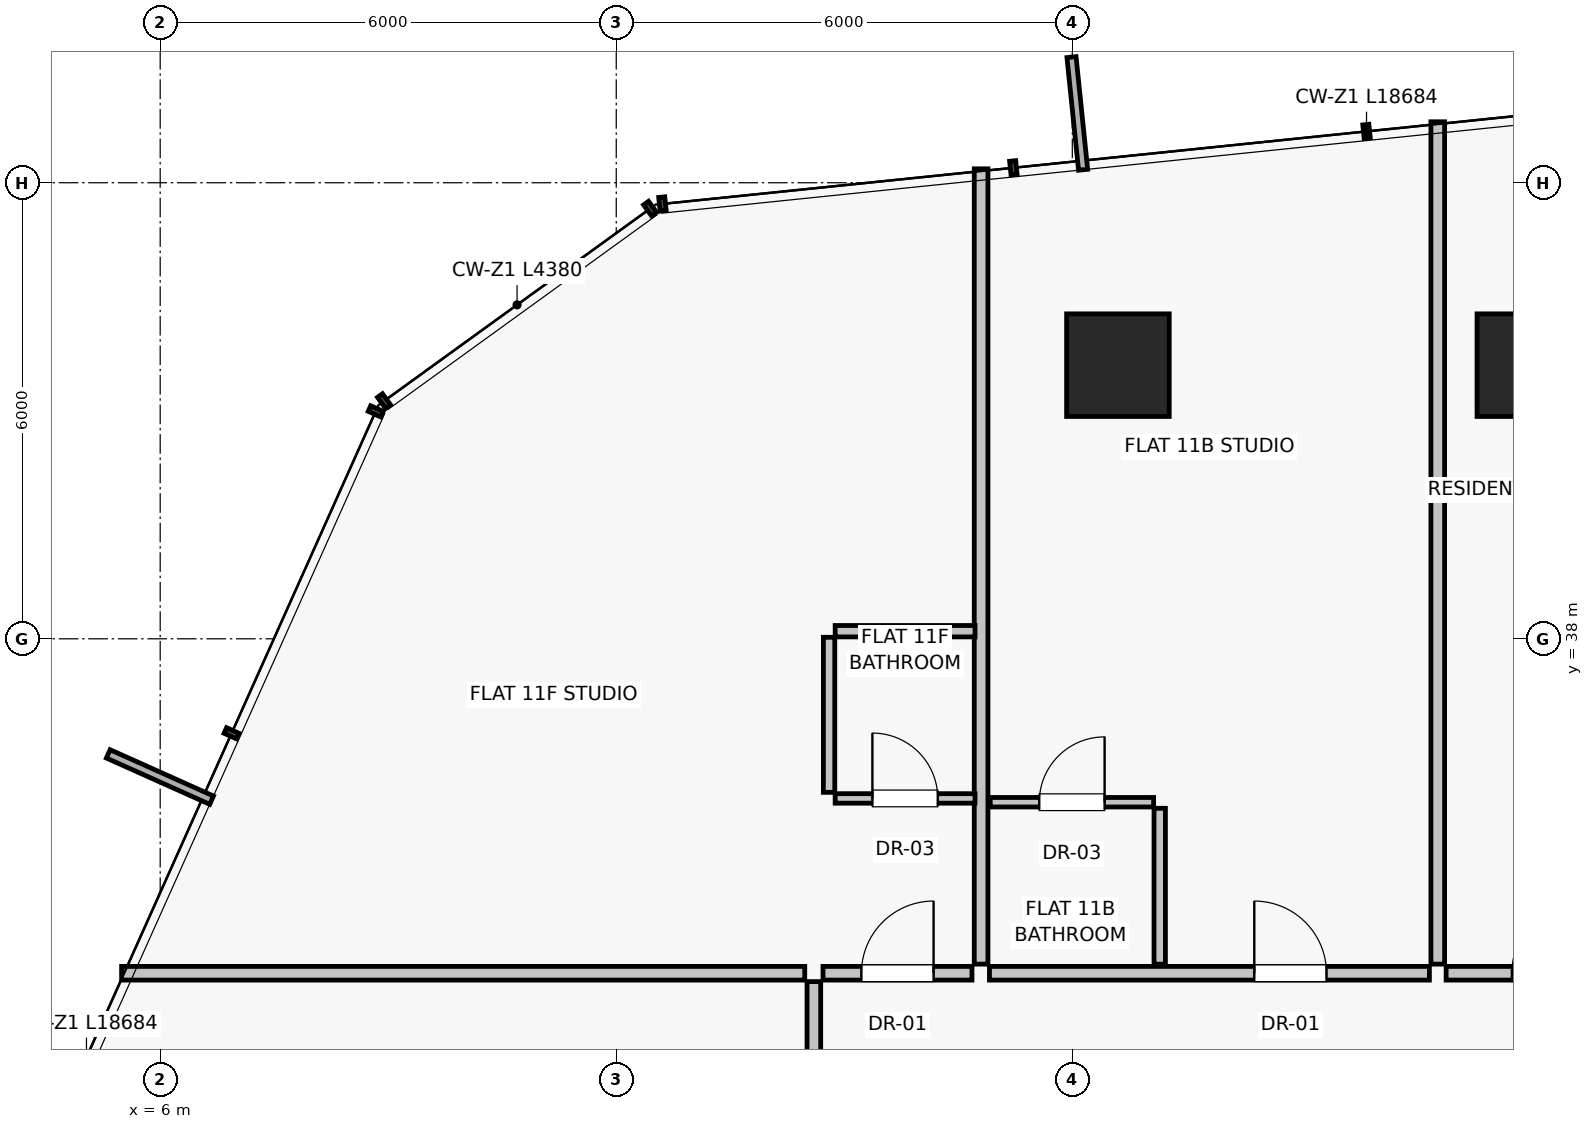
"""IFC4 building model, lengths in metres.
Left out: names, types, materials, properties, quantities, classifications, styles, units other than length and angle.
Written with IfcOpenShell. Run it as: python <this file> out.ifc"""

import sys

from ifc_helpers import new_model, si_unit, direction, frame, frame_2d, origin, origin_2d, place, context, subcontext, project, spatial, rectangle, extrude, source, transform, mapped, element, fill, save


model = new_model("IFC4")
c1 = context("Model", 3, precision=1e-05, world=origin(), true_north=direction((0.0, 1.0)))
c2 = subcontext(c1, "Body", "Model", "MODEL_VIEW")
j1 = project(units=[si_unit("LENGTHUNIT", "METRE"), si_unit("PLANEANGLEUNIT", "RADIAN")], contexts=[c1])
p1 = place(None, origin())
s1 = spatial("IfcSite", under=j1, at=p1, CompositionType="ELEMENT")
p2 = place(p1, origin())
s2 = spatial("IfcBuilding", under=s1, at=p2, CompositionType="ELEMENT")
p3 = place(p2, frame((0.0, 0.0, 43.55)))
s3 = spatial("IfcBuildingStorey", under=s2, at=p3, CompositionType="ELEMENT", Elevation=43.55)
for number, where, z_axis, x_axis in (
    (1, (24.0, 41.6, 0.0), (0.0, 0.0, 1.0), (1.0, 0.0, 0.0)),
    (2, (18.6, 41.6, 0.0), (0.0, 0.0, 1.0), (1.0, 0.0, 0.0)),
):
    element("IfcColumn", number, at=place(p3, frame(where, z_axis=z_axis, x_axis=x_axis)), inside=s3, PredefinedType="COLUMN", context=c2, shape_type="SweptSolid", body=[
        extrude(rectangle(XDim=1.35, YDim=1.35, at=origin_2d()), origin(), (0.0, 0.0, 1.0), 3.25),
    ])
p4 = place(p3, frame((16.8, 33.72, 0.0), z_axis=(0.0, 0.0, 1.0), x_axis=(0.0, 1.0, 0.0)))
e3 = element("IfcWall", 3, at=p4, inside=s3, PredefinedType="PARTITIONING", context=c2, shape_type="SweptSolid", body=[
    extrude(rectangle(XDim=10.463, YDim=0.18, at=frame_2d((5.231, 0.0))), origin(), (0.0, 0.0, 1.0), 3.0),
])
p5 = place(p3, frame((22.918, 33.6, 0.0), z_axis=(0.0, 0.0, 1.0), x_axis=(1.0, 0.0, 0.0)))
e4 = element("IfcWall", 4, at=p5, inside=s3, PredefinedType="PARTITIONING", context=c2, shape_type="SweptSolid", body=[
    extrude(rectangle(XDim=2.73, YDim=0.18, at=frame_2d((1.365, 0.0))), origin(), (0.0, 0.0, 1.0), 3.0),
])
p6 = place(p5, frame((0.865, 0.0, 0.0)))
e5 = element("IfcOpeningElement", 5, at=p6, cuts=e4, PredefinedType="OPENING", context=c2, shape_type="SweptSolid", body=[
    extrude(rectangle(XDim=1.0, YDim=2.01, at=frame_2d((0.5, 1.005))), frame((0.0, 0.1, 0.0), z_axis=(0.0, -1.0, 0.0), x_axis=(1.0, 0.0, 0.0)), (0.0, 0.0, 1.0), 0.2),
])
p7 = place(p3, frame((22.808, 33.72, 0.0), z_axis=(0.0, 0.0, 1.0), x_axis=(0.0, 1.0, 0.0)))
e6 = element("IfcWall", 6, at=p7, inside=s3, PredefinedType="PARTITIONING", context=c2, shape_type="SweptSolid", body=[
    extrude(rectangle(XDim=11.082, YDim=0.18, at=frame_2d((5.541, 0.0))), origin(), (0.0, 0.0, 1.0), 3.0),
])
p8 = place(p3, frame((16.91, 33.6, 0.0), z_axis=(0.0, 0.0, 1.0), x_axis=(1.0, 0.0, 0.0)))
e7 = element("IfcWall", 7, at=p8, inside=s3, PredefinedType="PARTITIONING", context=c2, shape_type="SweptSolid", body=[
    extrude(rectangle(XDim=5.788, YDim=0.18, at=frame_2d((2.894, 0.0))), origin(), (0.0, 0.0, 1.0), 3.0),
])
p9 = place(p8, frame((3.484, 0.0, 0.0)))
e8 = element("IfcOpeningElement", 8, at=p9, cuts=e7, PredefinedType="OPENING", context=c2, shape_type="SweptSolid", body=[
    extrude(rectangle(XDim=0.95, YDim=2.02, at=frame_2d((0.475, 1.01))), frame((0.0, 0.1, 0.0), z_axis=(0.0, -1.0, 0.0), x_axis=(1.0, 0.0, 0.0)), (0.0, 0.0, 1.0), 0.2),
])
p10 = place(p3, frame((19.15, 33.72, 0.0), z_axis=(0.0, 0.0, 1.0), x_axis=(0.0, 1.0, 0.0)))
e9 = element("IfcWall", 9, at=p10, inside=s3, PredefinedType="PARTITIONING", context=c2, shape_type="SweptSolid", body=[
    extrude(rectangle(XDim=2.05, YDim=0.15, at=frame_2d((1.025, 0.0))), origin(), (0.0, 0.0, 1.0), 3.0),
])
p11 = place(p3, frame((16.92, 35.85, 0.0), z_axis=(0.0, 0.0, 1.0), x_axis=(1.0, 0.0, 0.0)))
e10 = element("IfcWall", 10, at=p11, inside=s3, PredefinedType="PARTITIONING", context=c2, shape_type="SweptSolid", body=[
    extrude(rectangle(XDim=2.15, YDim=0.125, at=frame_2d((1.075, 0.0))), origin(), (0.0, 0.0, 1.0), 3.0),
])
p12 = place(p11, frame((0.645, 0.0, 0.0)))
e11 = element("IfcOpeningElement", 11, at=p12, cuts=e10, PredefinedType="OPENING", context=c2, shape_type="SweptSolid", body=[
    extrude(rectangle(XDim=0.86, YDim=2.01, at=frame_2d((0.43, 1.005))), frame((0.0, 0.073, 0.0), z_axis=(0.0, -1.0, 0.0), x_axis=(1.0, 0.0, 0.0)), (0.0, 0.0, 1.0), 0.145),
])
p13 = place(p3, frame((14.48, 33.6, 0.0), z_axis=(0.0, 0.0, 1.0), x_axis=(-1.0, 0.0, 0.0)))
e12 = element("IfcWall", 12, at=p13, inside=s3, PredefinedType="PARTITIONING", context=c2, shape_type="SweptSolid", body=[
    extrude(rectangle(XDim=8.988, YDim=0.18, at=frame_2d((4.494, 0.0))), origin(), (0.0, 0.0, 1.0), 3.0),
])
p14 = place(p3, frame((14.6, 29.003, 0.0), z_axis=(0.0, 0.0, 1.0), x_axis=(0.0, 1.0, 0.0)))
e13 = element("IfcWall", 13, at=p14, inside=s3, PredefinedType="PARTITIONING", context=c2, shape_type="SweptSolid", body=[
    extrude(rectangle(XDim=4.487, YDim=0.18, at=frame_2d((2.244, 0.0))), origin(), (0.0, 0.0, 1.0), 3.0),
])
p15 = place(p14, frame((1.743, 0.0, 0.0)))
e14 = element("IfcOpeningElement", 14, at=p15, cuts=e13, PredefinedType="OPENING", context=c2, shape_type="SweptSolid", body=[
    extrude(rectangle(XDim=1.0, YDim=2.01, at=frame_2d((0.5, 1.005))), frame((0.0, 0.1, 0.0), z_axis=(0.0, -1.0, 0.0), x_axis=(1.0, 0.0, 0.0)), (0.0, 0.0, 1.0), 0.2),
])
p16 = place(p3, frame((14.72, 33.6, 0.0), z_axis=(0.0, 0.0, 1.0), x_axis=(1.0, 0.0, 0.0)))
e15 = element("IfcWall", 15, at=p16, inside=s3, PredefinedType="PARTITIONING", context=c2, shape_type="SweptSolid", body=[
    extrude(rectangle(XDim=1.96, YDim=0.18, at=frame_2d((0.98, 0.0))), origin(), (0.0, 0.0, 1.0), 3.0),
])
p17 = place(p16, frame((0.505, 0.0, 0.0)))
e16 = element("IfcOpeningElement", 16, at=p17, cuts=e15, PredefinedType="OPENING", context=c2, shape_type="SweptSolid", body=[
    extrude(rectangle(XDim=0.95, YDim=2.02, at=frame_2d((0.475, 1.01))), frame((0.0, 0.1, 0.0), z_axis=(0.0, -1.0, 0.0), x_axis=(1.0, 0.0, 0.0)), (0.0, 0.0, 1.0), 0.2),
])
p18 = place(p3, frame((14.88, 35.9, 0.0), z_axis=(0.0, 0.0, 1.0), x_axis=(1.0, 0.0, 0.0)))
e17 = element("IfcWall", 17, at=p18, inside=s3, PredefinedType="PARTITIONING", context=c2, shape_type="SweptSolid", body=[
    extrude(rectangle(XDim=1.84, YDim=0.125, at=frame_2d((0.92, 0.0))), origin(), (0.0, 0.0, 1.0), 3.0),
])
p19 = place(p18, frame((0.49, 0.0, 0.0)))
e18 = element("IfcOpeningElement", 18, at=p19, cuts=e17, PredefinedType="OPENING", context=c2, shape_type="SweptSolid", body=[
    extrude(rectangle(XDim=0.86, YDim=2.01, at=frame_2d((0.43, 1.005))), frame((0.0, 0.073, 0.0), z_axis=(0.0, -1.0, 0.0), x_axis=(1.0, 0.0, 0.0)), (0.0, 0.0, 1.0), 0.145),
])
p20 = place(p3, frame((14.88, 38.1, 0.0), z_axis=(0.0, 0.0, 1.0), x_axis=(1.0, 0.0, 0.0)))
e19 = element("IfcWall", 19, at=p20, inside=s3, PredefinedType="PARTITIONING", context=c2, shape_type="SweptSolid", body=[
    extrude(rectangle(XDim=1.84, YDim=0.15, at=frame_2d((0.92, 0.0))), origin(), (0.0, 0.0, 1.0), 3.0),
])
p21 = place(p3, frame((14.8, 35.98, 0.0), z_axis=(0.0, 0.0, 1.0), x_axis=(0.0, 1.0, 0.0)))
e20 = element("IfcWall", 20, at=p21, inside=s3, PredefinedType="PARTITIONING", context=c2, shape_type="SweptSolid", body=[
    extrude(rectangle(XDim=2.04, YDim=0.15, at=frame_2d((1.02, 0.0))), origin(), (0.0, 0.0, 1.0), 3.0),
])
m1 = source(origin(), c2, "Body", "SweptSolid", [
    extrude(rectangle(XDim=1.0, YDim=2.01, at=frame_2d((0.5, 1.005))), frame((0.0, 0.025, 0.0), z_axis=(0.0, -1.0, 0.0), x_axis=(1.0, 0.0, 0.0)), (0.0, 0.0, 1.0), 0.05),
])
p22 = place(p6, origin())
e21 = element("IfcDoor", 21, at=p22, inside=s3, OperationType="SINGLE_SWING_RIGHT", PredefinedType="DOOR", context=c2, shape_type="MappedRepresentation", body=[
    mapped(m1, transform((0.0, 0.0, 0.0), scale=1.0)),
])
fill(e5, e21)
m2 = source(origin(), c2, "Body", "SweptSolid", [
    extrude(rectangle(XDim=0.95, YDim=2.02, at=frame_2d((0.475, 1.01))), frame((0.0, 0.025, 0.0), z_axis=(0.0, -1.0, 0.0), x_axis=(1.0, 0.0, 0.0)), (0.0, 0.0, 1.0), 0.05),
])
p23 = place(p9, origin())
e22 = element("IfcDoor", 22, at=p23, inside=s3, OperationType="SINGLE_SWING_LEFT", PredefinedType="DOOR", context=c2, shape_type="MappedRepresentation", body=[
    mapped(m2, transform((0.0, 0.0, 0.0), scale=1.0)),
])
fill(e8, e22)
m3 = source(origin(), c2, "Body", "SweptSolid", [
    extrude(rectangle(XDim=0.86, YDim=2.01, at=frame_2d((0.43, 1.005))), frame((0.0, 0.025, 0.0), z_axis=(0.0, -1.0, 0.0), x_axis=(1.0, 0.0, 0.0)), (0.0, 0.0, 1.0), 0.05),
])
p24 = place(p12, origin())
e23 = element("IfcDoor", 23, at=p24, inside=s3, OperationType="SINGLE_SWING_RIGHT", PredefinedType="DOOR", context=c2, shape_type="MappedRepresentation", body=[
    mapped(m3, transform((0.0, 0.0, 0.0), scale=1.0)),
])
fill(e11, e23)
p25 = place(p17, origin())
e24 = element("IfcDoor", 24, at=p25, inside=s3, OperationType="SINGLE_SWING_RIGHT", PredefinedType="DOOR", context=c2, shape_type="MappedRepresentation", body=[
    mapped(m2, transform((0.0, 0.0, 0.0), scale=1.0)),
])
fill(e16, e24)
p26 = place(p19, origin())
e25 = element("IfcDoor", 25, at=p26, inside=s3, OperationType="SINGLE_SWING_LEFT", PredefinedType="DOOR", context=c2, shape_type="MappedRepresentation", body=[
    mapped(m3, transform((0.0, 0.0, 0.0), scale=1.0)),
])
fill(e18, e25)
save(model, sys.argv[1])
